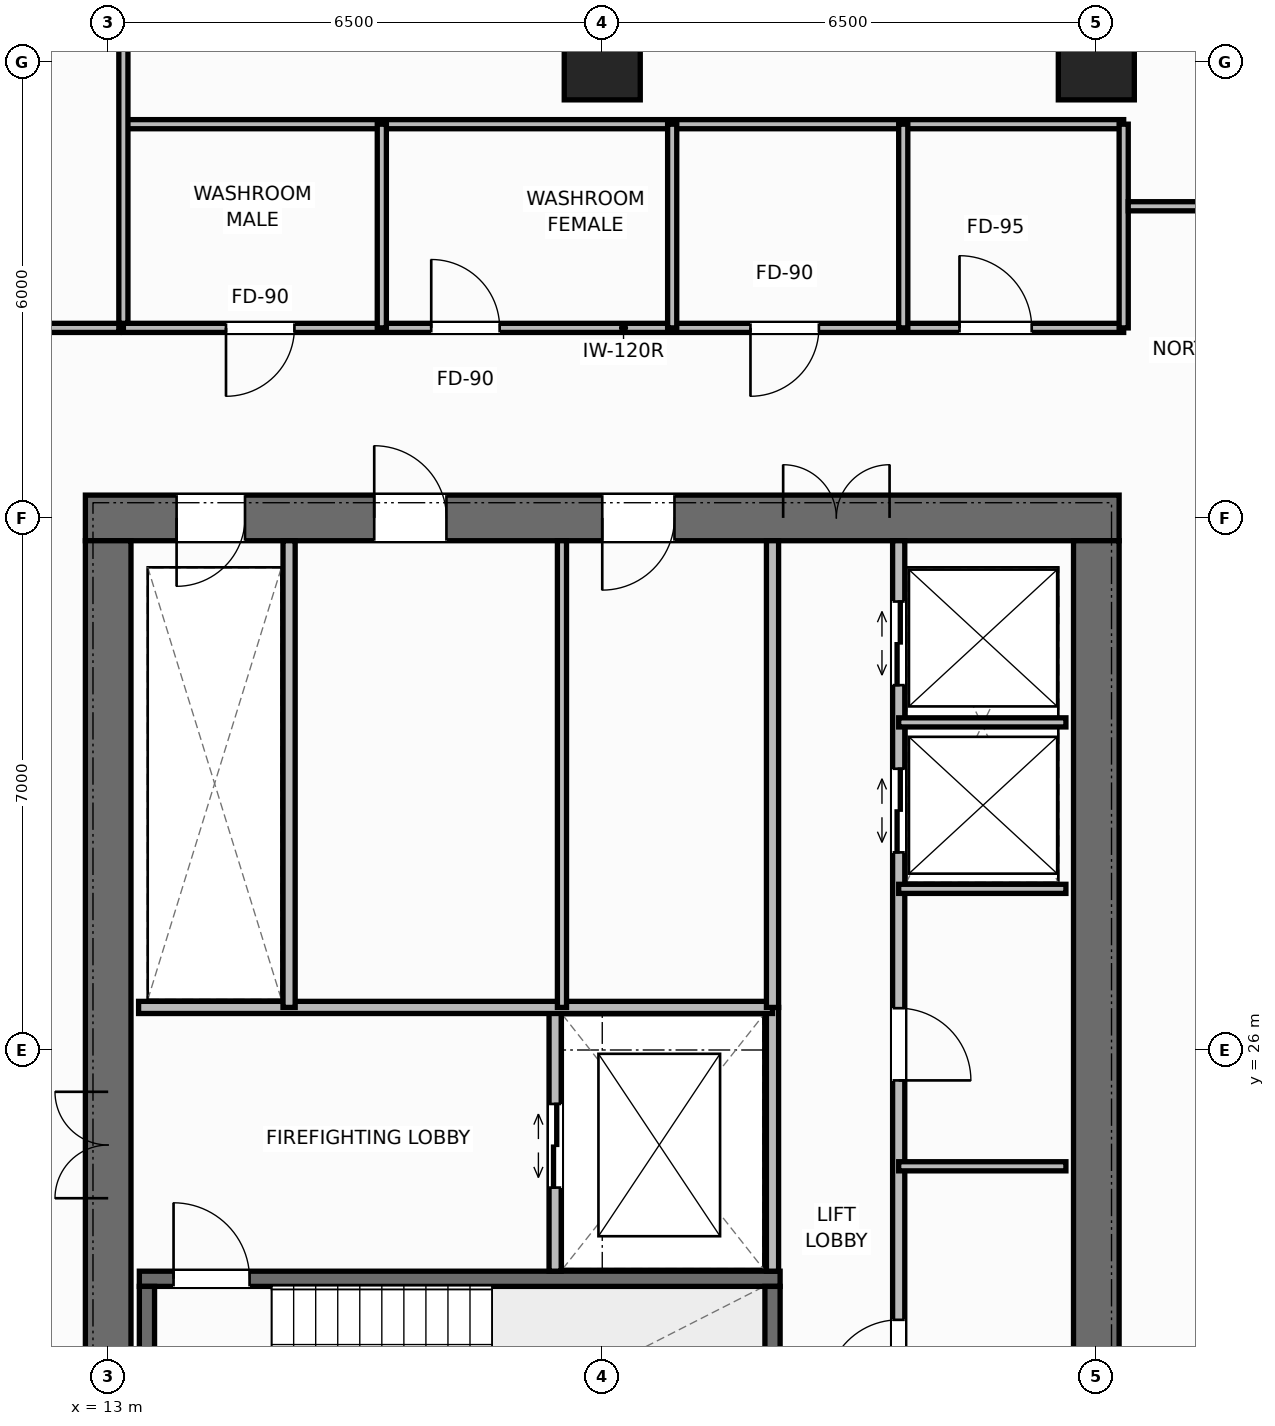
"""IFC4 building model, lengths in metres.
Left out: names, types, materials, properties, quantities, classifications, styles, units other than length and angle.
Written with IfcOpenShell. Run it as: python <this file> out.ifc"""

import sys

from ifc_helpers import new_model, si_unit, direction, frame, frame_2d, origin, origin_2d, place, context, subcontext, project, spatial, rectangle, extrude, element, fill, save


model = new_model("IFC4")
c1 = context("Model", 3, precision=1e-05, world=origin(), true_north=direction((0.0, 1.0)))
c2 = subcontext(c1, "Body", "Model", "MODEL_VIEW")
j1 = project(units=[si_unit("LENGTHUNIT", "METRE"), si_unit("PLANEANGLEUNIT", "RADIAN")], contexts=[c1])
p1 = place(None, origin())
s1 = spatial("IfcSite", under=j1, at=p1, CompositionType="ELEMENT")
p2 = place(p1, origin())
s2 = spatial("IfcBuilding", under=s1, at=p2, CompositionType="ELEMENT")
p3 = place(p2, frame((0.0, 0.0, 186.0)))
s3 = spatial("IfcBuildingStorey", under=s2, at=p3, CompositionType="ELEMENT", Elevation=186.0)
p4 = place(p3, frame((12.7, 33.0, 0.0), z_axis=(0.0, 0.0, 1.0), x_axis=(1.0, 0.0, 0.0)))
e1 = element("IfcWall", 1, at=p4, inside=s3, PredefinedType="SHEAR", context=c2, shape_type="SweptSolid", body=[
    extrude(rectangle(XDim=13.6, YDim=0.6, at=frame_2d((6.8, 0.0))), origin(), (0.0, 0.0, 1.0), 3.8),
])
p5 = place(p4, frame((1.2, 0.0, 0.0)))
e2 = element("IfcOpeningElement", 2, at=p5, cuts=e1, PredefinedType="OPENING", context=c2, shape_type="SweptSolid", body=[
    extrude(rectangle(XDim=0.9, YDim=2.15, at=frame_2d((0.45, 1.075))), frame((0.0, 0.31, 0.0), z_axis=(0.0, -1.0, 0.0), x_axis=(1.0, 0.0, 0.0)), (0.0, 0.0, 1.0), 0.62),
])
p6 = place(p4, frame((3.8, 0.0, 0.0)))
e3 = element("IfcOpeningElement", 3, at=p6, cuts=e1, PredefinedType="OPENING", context=c2, shape_type="SweptSolid", body=[
    extrude(rectangle(XDim=0.95, YDim=2.15, at=frame_2d((0.475, 1.075))), frame((0.0, 0.31, 0.0), z_axis=(0.0, -1.0, 0.0), x_axis=(1.0, 0.0, 0.0)), (0.0, 0.0, 1.0), 0.62),
])
p7 = place(p4, frame((6.8, 0.0, 0.0)))
e4 = element("IfcOpeningElement", 4, at=p7, cuts=e1, PredefinedType="OPENING", context=c2, shape_type="SweptSolid", body=[
    extrude(rectangle(XDim=0.95, YDim=2.15, at=frame_2d((0.475, 1.075))), frame((0.0, 0.31, 0.0), z_axis=(0.0, -1.0, 0.0), x_axis=(1.0, 0.0, 0.0)), (0.0, 0.0, 1.0), 0.62),
])
p8 = place(p4, frame((9.18, 0.0, 0.0)))
e5 = element("IfcOpeningElement", 5, at=p8, cuts=e1, PredefinedType="OPENING", context=c2, shape_type="SweptSolid", body=[
    extrude(rectangle(XDim=1.4, YDim=2.2, at=frame_2d((0.7, 1.1))), frame((0.0, 0.31, 0.0), z_axis=(0.0, -1.0, 0.0), x_axis=(1.0, 0.0, 0.0)), (0.0, 0.0, 1.0), 0.62),
])
p9 = place(p3, frame((13.0, 19.3, 0.0), z_axis=(0.0, 0.0, 1.0), x_axis=(0.0, 1.0, 0.0)))
e6 = element("IfcWall", 6, at=p9, inside=s3, PredefinedType="SHEAR", context=c2, shape_type="SweptSolid", body=[
    extrude(rectangle(XDim=13.4, YDim=0.6, at=frame_2d((6.7, 0.0))), origin(), (0.0, 0.0, 1.0), 3.8),
])
p10 = place(p9, frame((4.75, 0.0, 0.0)))
e7 = element("IfcOpeningElement", 7, at=p10, cuts=e6, PredefinedType="OPENING", context=c2, shape_type="SweptSolid", body=[
    extrude(rectangle(XDim=1.4, YDim=2.2, at=frame_2d((0.7, 1.1))), frame((0.0, 0.31, 0.0), z_axis=(0.0, -1.0, 0.0), x_axis=(1.0, 0.0, 0.0)), (0.0, 0.0, 1.0), 0.62),
])
p11 = place(p3, frame((26.0, 19.3, 0.0), z_axis=(0.0, 0.0, 1.0), x_axis=(0.0, 1.0, 0.0)))
e8 = element("IfcWall", 8, at=p11, inside=s3, PredefinedType="SHEAR", context=c2, shape_type="SweptSolid", body=[
    extrude(rectangle(XDim=13.4, YDim=0.6, at=frame_2d((6.7, 0.0))), origin(), (0.0, 0.0, 1.0), 3.8),
])
p12 = place(p3, frame((13.41, 22.99, 0.0), z_axis=(0.0, 0.0, 1.0), x_axis=(1.0, 0.0, 0.0)))
e9 = element("IfcWall", 9, at=p12, inside=s3, PredefinedType="SHEAR", context=c2, shape_type="SweptSolid", body=[
    extrude(rectangle(XDim=8.43, YDim=0.2, at=frame_2d((4.215, 0.0))), origin(), (0.0, 0.0, 1.0), 3.8),
])
p13 = place(p12, frame((0.45, 0.0, 0.0)))
e10 = element("IfcOpeningElement", 10, at=p13, cuts=e9, PredefinedType="OPENING", context=c2, shape_type="SweptSolid", body=[
    extrude(rectangle(XDim=1.0, YDim=2.15, at=frame_2d((0.5, 1.075))), frame((0.0, 0.11, 0.0), z_axis=(0.0, -1.0, 0.0), x_axis=(1.0, 0.0, 0.0)), (0.0, 0.0, 1.0), 0.22),
])
for number, where, z_axis, x_axis in (
    (11, (13.51, 19.61, 0.0), (0.0, 0.0, 1.0), (0.0, 1.0, 0.0)),
    (12, (21.74, 19.61, 0.0), (0.0, 0.0, 1.0), (0.0, 1.0, 0.0)),
):
    element("IfcWall", number, at=place(p3, frame(where, z_axis=z_axis, x_axis=x_axis)), inside=s3, PredefinedType="SHEAR", context=c2, shape_type="SweptSolid", body=[
        extrude(rectangle(XDim=3.28, YDim=0.2, at=frame_2d((1.64, 0.0))), origin(), (0.0, 0.0, 1.0), 3.8),
    ])
for number, where, z_axis, x_axis in (
    (13, (19.5, 39.0, 0.0), (0.0, 0.0, 1.0), (1.0, 0.0, 0.0)),
    (14, (26.0, 39.0, 0.0), (0.0, 0.0, 1.0), (1.0, 0.0, 0.0)),
):
    element("IfcColumn", number, at=place(p3, frame(where, z_axis=z_axis, x_axis=x_axis)), inside=s3, PredefinedType="COLUMN", context=c2, shape_type="SweptSolid", body=[
        extrude(rectangle(XDim=1.0, YDim=1.0, at=origin_2d()), origin(), (0.0, 0.0, 1.0), 3.8),
    ])
p14 = place(p3, frame((21.74, 23.09, 0.0), z_axis=(0.0, 0.0, 1.0), x_axis=(0.0, 1.0, 0.0)))
e15 = element("IfcWall", 15, at=p14, inside=s3, PredefinedType="STANDARD", context=c2, shape_type="SweptSolid", body=[
    extrude(rectangle(XDim=3.47, YDim=0.16, at=frame_2d((1.735, 0.0))), origin(), (0.0, 0.0, 1.0), 3.572),
])
p15 = place(p3, frame((18.88, 23.09, 0.0), z_axis=(0.0, 0.0, 1.0), x_axis=(0.0, 1.0, 0.0)))
e16 = element("IfcWall", 16, at=p15, inside=s3, PredefinedType="STANDARD", context=c2, shape_type="SweptSolid", body=[
    extrude(rectangle(XDim=3.47, YDim=0.16, at=frame_2d((1.735, 0.0))), origin(), (0.0, 0.0, 1.0), 3.572),
])
p16 = place(p15, frame((1.1, 0.0, 0.0)))
e17 = element("IfcOpeningElement", 17, at=p16, cuts=e16, PredefinedType="OPENING", context=c2, shape_type="SweptSolid", body=[
    extrude(rectangle(XDim=1.1, YDim=2.2, at=frame_2d((0.55, 1.1))), frame((0.0, 0.09, 0.0), z_axis=(0.0, -1.0, 0.0), x_axis=(1.0, 0.0, 0.0)), (0.0, 0.0, 1.0), 0.18),
])
p17 = place(p3, frame((13.4, 26.56, 0.0), z_axis=(0.0, 0.0, 1.0), x_axis=(1.0, 0.0, 0.0)))
e18 = element("IfcWall", 18, at=p17, inside=s3, PredefinedType="STANDARD", context=c2, shape_type="SweptSolid", body=[
    extrude(rectangle(XDim=8.34, YDim=0.16, at=frame_2d((4.17, 0.0))), origin(), (0.0, 0.0, 1.0), 3.572),
])
p18 = place(p3, frame((15.38, 26.56, 0.0), z_axis=(0.0, 0.0, 1.0), x_axis=(0.0, 1.0, 0.0)))
e19 = element("IfcWall", 19, at=p18, inside=s3, PredefinedType="STANDARD", context=c2, shape_type="SweptSolid", body=[
    extrude(rectangle(XDim=6.14, YDim=0.16, at=frame_2d((3.07, 0.0))), origin(), (0.0, 0.0, 1.0), 3.572),
])
p19 = place(p3, frame((18.97, 26.56, 0.0), z_axis=(0.0, 0.0, 1.0), x_axis=(0.0, 1.0, 0.0)))
e20 = element("IfcWall", 20, at=p19, inside=s3, PredefinedType="PARTITIONING", context=c2, shape_type="SweptSolid", body=[
    extrude(rectangle(XDim=6.14, YDim=0.12, at=frame_2d((3.07, 0.0))), origin(), (0.0, 0.0, 1.0), 3.572),
])
p20 = place(p3, frame((21.74, 26.56, 0.0), z_axis=(0.0, 0.0, 1.0), x_axis=(0.0, 1.0, 0.0)))
e21 = element("IfcWall", 21, at=p20, inside=s3, PredefinedType="STANDARD", context=c2, shape_type="SweptSolid", body=[
    extrude(rectangle(XDim=6.14, YDim=0.16, at=frame_2d((3.07, 0.0))), origin(), (0.0, 0.0, 1.0), 3.572),
])
p21 = place(p3, frame((23.4, 19.3, 0.0), z_axis=(0.0, 0.0, 1.0), x_axis=(0.0, 1.0, 0.0)))
e22 = element("IfcWall", 22, at=p21, inside=s3, PredefinedType="STANDARD", context=c2, shape_type="SweptSolid", body=[
    extrude(rectangle(XDim=13.4, YDim=0.16, at=frame_2d((6.7, 0.0))), origin(), (0.0, 0.0, 1.0), 3.572),
])
p22 = place(p21, frame((2.2, 0.0, 0.0)))
e23 = element("IfcOpeningElement", 23, at=p22, cuts=e22, PredefinedType="OPENING", context=c2, shape_type="SweptSolid", body=[
    extrude(rectangle(XDim=0.95, YDim=2.15, at=frame_2d((0.475, 1.075))), frame((0.0, 0.09, 0.0), z_axis=(0.0, -1.0, 0.0), x_axis=(1.0, 0.0, 0.0)), (0.0, 0.0, 1.0), 0.18),
])
p23 = place(p21, frame((6.3, 0.0, 0.0)))
e24 = element("IfcOpeningElement", 24, at=p23, cuts=e22, PredefinedType="OPENING", context=c2, shape_type="SweptSolid", body=[
    extrude(rectangle(XDim=0.95, YDim=2.15, at=frame_2d((0.475, 1.075))), frame((0.0, 0.09, 0.0), z_axis=(0.0, -1.0, 0.0), x_axis=(1.0, 0.0, 0.0)), (0.0, 0.0, 1.0), 0.18),
])
p24 = place(p21, frame((9.3, 0.0, 0.0)))
e25 = element("IfcOpeningElement", 25, at=p24, cuts=e22, PredefinedType="OPENING", context=c2, shape_type="SweptSolid", body=[
    extrude(rectangle(XDim=1.1, YDim=2.2, at=frame_2d((0.55, 1.1))), frame((0.0, 0.09, 0.0), z_axis=(0.0, -1.0, 0.0), x_axis=(1.0, 0.0, 0.0)), (0.0, 0.0, 1.0), 0.18),
])
p25 = place(p21, frame((11.5, 0.0, 0.0)))
e26 = element("IfcOpeningElement", 26, at=p25, cuts=e22, PredefinedType="OPENING", context=c2, shape_type="SweptSolid", body=[
    extrude(rectangle(XDim=1.1, YDim=2.2, at=frame_2d((0.55, 1.1))), frame((0.0, 0.09, 0.0), z_axis=(0.0, -1.0, 0.0), x_axis=(1.0, 0.0, 0.0)), (0.0, 0.0, 1.0), 0.18),
])
for number, where, z_axis, x_axis in (
    (27, (23.4, 24.47, 0.0), (0.0, 0.0, 1.0), (1.0, 0.0, 0.0)),
    (28, (23.4, 28.12, 0.0), (0.0, 0.0, 1.0), (1.0, 0.0, 0.0)),
    (29, (23.4, 30.31, 0.0), (0.0, 0.0, 1.0), (1.0, 0.0, 0.0)),
):
    element("IfcWall", number, at=place(p3, frame(where, z_axis=z_axis, x_axis=x_axis)), inside=s3, PredefinedType="PARTITIONING", context=c2, shape_type="SweptSolid", body=[
        extrude(rectangle(XDim=2.2, YDim=0.12, at=frame_2d((1.1, 0.0))), origin(), (0.0, 0.0, 1.0), 3.572),
    ])
p26 = place(p3, frame((13.2, 35.5, 0.0), z_axis=(0.0, 0.0, 1.0), x_axis=(1.0, 0.0, 0.0)))
e30 = element("IfcWall", 30, at=p26, inside=s3, PredefinedType="PARTITIONING", context=c2, shape_type="SweptSolid", body=[
    extrude(rectangle(XDim=13.16, YDim=0.12, at=frame_2d((6.58, 0.0))), origin(), (0.0, 0.0, 1.0), 3.572),
])
p27 = place(p26, frame((1.35, 0.0, 0.0)))
e31 = element("IfcOpeningElement", 31, at=p27, cuts=e30, PredefinedType="OPENING", context=c2, shape_type="SweptSolid", body=[
    extrude(rectangle(XDim=0.9, YDim=2.15, at=frame_2d((0.45, 1.075))), frame((0.0, 0.07, 0.0), z_axis=(0.0, -1.0, 0.0), x_axis=(1.0, 0.0, 0.0)), (0.0, 0.0, 1.0), 0.14),
])
p28 = place(p26, frame((4.05, 0.0, 0.0)))
e32 = element("IfcOpeningElement", 32, at=p28, cuts=e30, PredefinedType="OPENING", context=c2, shape_type="SweptSolid", body=[
    extrude(rectangle(XDim=0.9, YDim=2.15, at=frame_2d((0.45, 1.075))), frame((0.0, 0.07, 0.0), z_axis=(0.0, -1.0, 0.0), x_axis=(1.0, 0.0, 0.0)), (0.0, 0.0, 1.0), 0.14),
])
p29 = place(p26, frame((8.25, 0.0, 0.0)))
e33 = element("IfcOpeningElement", 33, at=p29, cuts=e30, PredefinedType="OPENING", context=c2, shape_type="SweptSolid", body=[
    extrude(rectangle(XDim=0.9, YDim=2.15, at=frame_2d((0.45, 1.075))), frame((0.0, 0.07, 0.0), z_axis=(0.0, -1.0, 0.0), x_axis=(1.0, 0.0, 0.0)), (0.0, 0.0, 1.0), 0.14),
])
p30 = place(p26, frame((11.0, 0.0, 0.0)))
e34 = element("IfcOpeningElement", 34, at=p30, cuts=e30, PredefinedType="OPENING", context=c2, shape_type="SweptSolid", body=[
    extrude(rectangle(XDim=0.95, YDim=2.15, at=frame_2d((0.475, 1.075))), frame((0.0, 0.07, 0.0), z_axis=(0.0, -1.0, 0.0), x_axis=(1.0, 0.0, 0.0)), (0.0, 0.0, 1.0), 0.14),
])
p31 = place(p3, frame((13.2, 38.18, 0.0), z_axis=(0.0, 0.0, 1.0), x_axis=(1.0, 0.0, 0.0)))
e35 = element("IfcWall", 35, at=p31, inside=s3, PredefinedType="PARTITIONING", context=c2, shape_type="SweptSolid", body=[
    extrude(rectangle(XDim=13.16, YDim=0.12, at=frame_2d((6.58, 0.0))), origin(), (0.0, 0.0, 1.0), 3.572),
])
for number, where, z_axis, x_axis in (
    (36, (16.6, 35.5, 0.0), (0.0, 0.0, 1.0), (0.0, 1.0, 0.0)),
    (37, (20.42, 35.5, 0.0), (0.0, 0.0, 1.0), (0.0, 1.0, 0.0)),
    (38, (23.46, 35.5, 0.0), (0.0, 0.0, 1.0), (0.0, 1.0, 0.0)),
    (39, (26.36, 35.5, 0.0), (0.0, 0.0, 1.0), (0.0, 1.0, 0.0)),
):
    element("IfcWall", number, at=place(p3, frame(where, z_axis=z_axis, x_axis=x_axis)), inside=s3, PredefinedType="PARTITIONING", context=c2, shape_type="SweptSolid", body=[
        extrude(rectangle(XDim=2.68, YDim=0.12, at=frame_2d((1.34, 0.0))), origin(), (0.0, 0.0, 1.0), 3.572),
    ])
p32 = place(p3, frame((13.2, 35.56, 0.0), z_axis=(0.0, 0.0, 1.0), x_axis=(0.0, 1.0, 0.0)))
e40 = element("IfcWall", 40, at=p32, inside=s3, PredefinedType="PARTITIONING", context=c2, shape_type="SweptSolid", body=[
    extrude(rectangle(XDim=13.02, YDim=0.12, at=frame_2d((6.51, 0.0))), origin(), (0.0, 0.0, 1.0), 3.022),
])
p33 = place(p3, frame((3.98, 35.5, 0.0), z_axis=(0.0, 0.0, 1.0), x_axis=(1.0, 0.0, 0.0)))
e41 = element("IfcWall", 41, at=p33, inside=s3, PredefinedType="PARTITIONING", context=c2, shape_type="SweptSolid", body=[
    extrude(rectangle(XDim=9.16, YDim=0.12, at=frame_2d((4.58, 0.0))), origin(), (0.0, 0.0, 1.0), 3.572),
])
p34 = place(p33, frame((6.9, 0.0, 0.0)))
e42 = element("IfcOpeningElement", 42, at=p34, cuts=e41, PredefinedType="OPENING", context=c2, shape_type="SweptSolid", body=[
    extrude(rectangle(XDim=0.95, YDim=2.15, at=frame_2d((0.475, 1.075))), frame((0.0, 0.07, 0.0), z_axis=(0.0, -1.0, 0.0), x_axis=(1.0, 0.0, 0.0)), (0.0, 0.0, 1.0), 0.14),
])
p35 = place(p3, frame((26.42, 37.1, 0.0), z_axis=(0.0, 0.0, 1.0), x_axis=(1.0, 0.0, 0.0)))
e43 = element("IfcWall", 43, at=p35, inside=s3, PredefinedType="PARTITIONING", context=c2, shape_type="SweptSolid", body=[
    extrude(rectangle(XDim=9.32, YDim=0.12, at=frame_2d((4.66, 0.0))), origin(), (0.0, 0.0, 1.0), 3.572),
])
p36 = place(p35, frame((4.185, 0.0, 0.0)))
e44 = element("IfcOpeningElement", 44, at=p36, cuts=e43, PredefinedType="OPENING", context=c2, shape_type="SweptSolid", body=[
    extrude(rectangle(XDim=0.95, YDim=2.15, at=frame_2d((0.475, 1.075))), frame((0.0, 0.07, 0.0), z_axis=(0.0, -1.0, 0.0), x_axis=(1.0, 0.0, 0.0)), (0.0, 0.0, 1.0), 0.14),
])
p37 = place(p13, origin())
e45 = element("IfcDoor", 45, at=p37, inside=s3, OperationType="SINGLE_SWING_LEFT", PredefinedType="DOOR", context=c2, shape_type="SweptSolid", body=[
    extrude(rectangle(XDim=1.0, YDim=2.15, at=frame_2d((0.5, 1.075))), frame((0.0, 0.025, 0.0), z_axis=(0.0, -1.0, 0.0), x_axis=(1.0, 0.0, 0.0)), (0.0, 0.0, 1.0), 0.05),
])
fill(e10, e45)
p38 = place(p10, origin())
e46 = element("IfcDoor", 46, at=p38, inside=s3, OperationType="DOUBLE_DOOR_SINGLE_SWING", PredefinedType="DOOR", context=c2, shape_type="SweptSolid", body=[
    extrude(rectangle(XDim=1.4, YDim=2.2, at=frame_2d((0.7, 1.1))), frame((0.0, 0.025, 0.0), z_axis=(0.0, -1.0, 0.0), x_axis=(1.0, 0.0, 0.0)), (0.0, 0.0, 1.0), 0.05),
])
fill(e7, e46)
p39 = place(p16, origin())
e47 = element("IfcDoor", 47, at=p39, inside=s3, OperationType="DOUBLE_DOOR_SLIDING", PredefinedType="DOOR", context=c2, shape_type="SweptSolid", body=[
    extrude(rectangle(XDim=1.1, YDim=2.2, at=frame_2d((0.55, 1.1))), frame((0.0, 0.025, 0.0), z_axis=(0.0, -1.0, 0.0), x_axis=(1.0, 0.0, 0.0)), (0.0, 0.0, 1.0), 0.05),
])
fill(e17, e47)
p40 = place(p5, origin())
e48 = element("IfcDoor", 48, at=p40, inside=s3, OperationType="SINGLE_SWING_RIGHT", PredefinedType="DOOR", context=c2, shape_type="SweptSolid", body=[
    extrude(rectangle(XDim=0.9, YDim=2.15, at=frame_2d((0.45, 1.075))), frame((0.0, -0.025, 0.0), z_axis=(0.0, -1.0, 0.0), x_axis=(1.0, 0.0, 0.0)), (0.0, 0.0, 1.0), 0.05),
])
fill(e2, e48)
p41 = place(p6, origin())
e49 = element("IfcDoor", 49, at=p41, inside=s3, OperationType="SINGLE_SWING_LEFT", PredefinedType="DOOR", context=c2, shape_type="SweptSolid", body=[
    extrude(rectangle(XDim=0.95, YDim=2.15, at=frame_2d((0.475, 1.075))), frame((0.0, -0.025, 0.0), z_axis=(0.0, -1.0, 0.0), x_axis=(1.0, 0.0, 0.0)), (0.0, 0.0, 1.0), 0.05),
])
fill(e3, e49)
p42 = place(p7, origin())
e50 = element("IfcDoor", 50, at=p42, inside=s3, OperationType="SINGLE_SWING_RIGHT", PredefinedType="DOOR", context=c2, shape_type="SweptSolid", body=[
    extrude(rectangle(XDim=0.95, YDim=2.15, at=frame_2d((0.475, 1.075))), frame((0.0, -0.025, 0.0), z_axis=(0.0, -1.0, 0.0), x_axis=(1.0, 0.0, 0.0)), (0.0, 0.0, 1.0), 0.05),
])
fill(e4, e50)
p43 = place(p8, origin())
e51 = element("IfcDoor", 51, at=p43, inside=s3, OperationType="DOUBLE_DOOR_SINGLE_SWING", PredefinedType="DOOR", context=c2, shape_type="SweptSolid", body=[
    extrude(rectangle(XDim=1.4, YDim=2.2, at=frame_2d((0.7, 1.1))), frame((0.0, -0.025, 0.0), z_axis=(0.0, -1.0, 0.0), x_axis=(1.0, 0.0, 0.0)), (0.0, 0.0, 1.0), 0.05),
])
fill(e5, e51)
p44 = place(p22, origin())
e52 = element("IfcDoor", 52, at=p44, inside=s3, OperationType="SINGLE_SWING_LEFT", PredefinedType="DOOR", context=c2, shape_type="SweptSolid", body=[
    extrude(rectangle(XDim=0.95, YDim=2.15, at=frame_2d((0.475, 1.075))), frame((0.0, 0.025, 0.0), z_axis=(0.0, -1.0, 0.0), x_axis=(1.0, 0.0, 0.0)), (0.0, 0.0, 1.0), 0.05),
])
fill(e23, e52)
p45 = place(p23, origin())
e53 = element("IfcDoor", 53, at=p45, inside=s3, OperationType="SINGLE_SWING_RIGHT", PredefinedType="DOOR", context=c2, shape_type="SweptSolid", body=[
    extrude(rectangle(XDim=0.95, YDim=2.15, at=frame_2d((0.475, 1.075))), frame((0.0, 0.025, 0.0), z_axis=(0.0, -1.0, 0.0), x_axis=(1.0, 0.0, 0.0)), (0.0, 0.0, 1.0), 0.05),
])
fill(e24, e53)
p46 = place(p24, origin())
e54 = element("IfcDoor", 54, at=p46, inside=s3, OperationType="DOUBLE_DOOR_SLIDING", PredefinedType="DOOR", context=c2, shape_type="SweptSolid", body=[
    extrude(rectangle(XDim=1.1, YDim=2.2, at=frame_2d((0.55, 1.1))), frame((0.0, 0.025, 0.0), z_axis=(0.0, -1.0, 0.0), x_axis=(1.0, 0.0, 0.0)), (0.0, 0.0, 1.0), 0.05),
])
fill(e25, e54)
p47 = place(p25, origin())
e55 = element("IfcDoor", 55, at=p47, inside=s3, OperationType="DOUBLE_DOOR_SLIDING", PredefinedType="DOOR", context=c2, shape_type="SweptSolid", body=[
    extrude(rectangle(XDim=1.1, YDim=2.2, at=frame_2d((0.55, 1.1))), frame((0.0, 0.025, 0.0), z_axis=(0.0, -1.0, 0.0), x_axis=(1.0, 0.0, 0.0)), (0.0, 0.0, 1.0), 0.05),
])
fill(e26, e55)
p48 = place(p27, origin())
e56 = element("IfcDoor", 56, at=p48, inside=s3, OperationType="SINGLE_SWING_RIGHT", PredefinedType="DOOR", context=c2, shape_type="SweptSolid", body=[
    extrude(rectangle(XDim=0.9, YDim=2.15, at=frame_2d((0.45, 1.075))), frame((0.0, 0.025, 0.0), z_axis=(0.0, -1.0, 0.0), x_axis=(1.0, 0.0, 0.0)), (0.0, 0.0, 1.0), 0.05),
])
fill(e31, e56)
p49 = place(p28, origin())
e57 = element("IfcDoor", 57, at=p49, inside=s3, OperationType="SINGLE_SWING_LEFT", PredefinedType="DOOR", context=c2, shape_type="SweptSolid", body=[
    extrude(rectangle(XDim=0.9, YDim=2.15, at=frame_2d((0.45, 1.075))), frame((0.0, 0.025, 0.0), z_axis=(0.0, -1.0, 0.0), x_axis=(1.0, 0.0, 0.0)), (0.0, 0.0, 1.0), 0.05),
])
fill(e32, e57)
p50 = place(p29, origin())
e58 = element("IfcDoor", 58, at=p50, inside=s3, OperationType="SINGLE_SWING_RIGHT", PredefinedType="DOOR", context=c2, shape_type="SweptSolid", body=[
    extrude(rectangle(XDim=0.9, YDim=2.15, at=frame_2d((0.45, 1.075))), frame((0.0, 0.025, 0.0), z_axis=(0.0, -1.0, 0.0), x_axis=(1.0, 0.0, 0.0)), (0.0, 0.0, 1.0), 0.05),
])
fill(e33, e58)
p51 = place(p30, origin())
e59 = element("IfcDoor", 59, at=p51, inside=s3, OperationType="SINGLE_SWING_LEFT", PredefinedType="DOOR", context=c2, shape_type="SweptSolid", body=[
    extrude(rectangle(XDim=0.95, YDim=2.15, at=frame_2d((0.475, 1.075))), frame((0.0, 0.025, 0.0), z_axis=(0.0, -1.0, 0.0), x_axis=(1.0, 0.0, 0.0)), (0.0, 0.0, 1.0), 0.05),
])
fill(e34, e59)
save(model, sys.argv[1])
